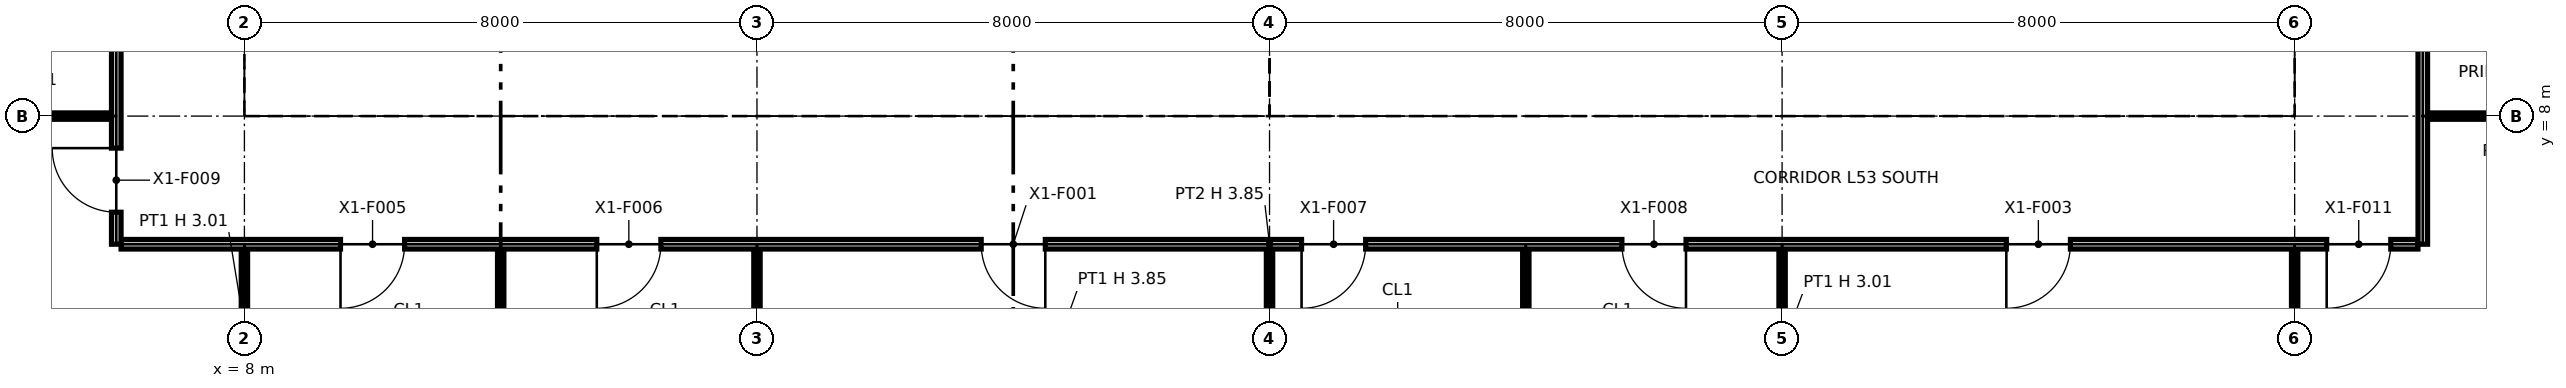
"""IFC4 building model, lengths in metres.
Left out: names, types, materials, properties, quantities, classifications, styles, units other than length and angle.
Written with IfcOpenShell. Run it as: python <this file> out.ifc"""

import sys

from ifc_helpers import new_model, si_unit, direction, frame, frame_2d, origin, origin_2d, place, context, subcontext, project, spatial, polyline, rectangle, i_section, outline, extrude, element, fill, save


model = new_model("IFC4")
c1 = context("Model", 3, precision=1e-05, world=origin(), true_north=direction((0.0, 1.0)))
c2 = subcontext(c1, "Body", "Model", "MODEL_VIEW")
j1 = project(units=[si_unit("LENGTHUNIT", "METRE"), si_unit("PLANEANGLEUNIT", "RADIAN")], contexts=[c1])
p1 = place(None, origin())
s1 = spatial("IfcSite", under=j1, at=p1, CompositionType="ELEMENT")
p2 = place(p1, origin())
s2 = spatial("IfcBuilding", under=s1, at=p2, CompositionType="ELEMENT")
p3 = place(p2, frame((0.0, 0.0, 247.0)))
s3 = spatial("IfcBuildingStorey", under=s2, at=p3, CompositionType="ELEMENT", Elevation=247.0)
for number, where, z_axis, x_axis in (
    (1, (8.0, 8.0, 0.0), (0.0, 0.0, 1.0), (1.0, 0.0, 0.0)),
    (2, (16.0, 8.0, 0.0), (0.0, 0.0, 1.0), (1.0, 0.0, 0.0)),
):
    element("IfcColumn", number, at=place(p3, frame(where, z_axis=z_axis, x_axis=x_axis)), inside=s3, PredefinedType="COLUMN", context=c2, shape_type="SweptSolid", body=[
        extrude(i_section(OverallWidth=0.371, OverallDepth=0.361, WebThickness=0.012, FlangeThickness=0.02, at=origin_2d()), origin(), (0.0, 0.0, 1.0), 3.85),
    ])
p4 = place(p3, frame((24.0, 8.0, 0.0), z_axis=(0.0, 0.0, 1.0), x_axis=(1.0, 0.0, 0.0)))
e3 = element("IfcColumn", 3, at=p4, inside=s3, PredefinedType="COLUMN", context=c2, shape_type="SweptSolid", body=[
    extrude(i_section(OverallWidth=0.373, OverallDepth=0.368, WebThickness=0.015, FlangeThickness=0.024, at=origin_2d()), origin(), (0.0, 0.0, 1.0), 3.85),
])
for number, where, z_axis, x_axis in (
    (4, (32.0, 8.0, 0.0), (0.0, 0.0, 1.0), (1.0, 0.0, 0.0)),
    (5, (40.0, 8.0, 0.0), (0.0, 0.0, 1.0), (1.0, 0.0, 0.0)),
):
    element("IfcColumn", number, at=place(p3, frame(where, z_axis=z_axis, x_axis=x_axis)), inside=s3, PredefinedType="COLUMN", context=c2, shape_type="SweptSolid", body=[
        extrude(i_section(OverallWidth=0.371, OverallDepth=0.361, WebThickness=0.012, FlangeThickness=0.02, at=origin_2d()), origin(), (0.0, 0.0, 1.0), 3.85),
    ])
p5 = place(p3, frame((8.65, 8.75, 0.0), z_axis=(0.0, 0.0, 1.0), x_axis=(1.0, 0.0, 0.0)))
e6 = element("IfcWall", 6, at=p5, inside=s3, PredefinedType="PARTITIONING", context=c2, shape_type="SweptSolid", body=[
    extrude(outline(polyline([(0.0, 0.0), (14.7, 0.0), (14.7, 3.85), (7.438, 3.85), (7.438, 3.308), (7.262, 3.308), (7.261, 3.85), (0.0, 3.85), (0.0, 0.0)])), frame((0.0, 0.1, 0.0), z_axis=(0.0, -1.0, 0.0), x_axis=(1.0, 0.0, 0.0)), (0.0, 0.0, 1.0), 0.2),
])
p6 = place(p5, frame((1.3, 0.0, 0.0)))
e7 = element("IfcOpeningElement", 7, at=p6, cuts=e6, PredefinedType="OPENING", context=c2, shape_type="SweptSolid", body=[
    extrude(rectangle(XDim=1.4, YDim=2.1, at=frame_2d((0.7, 1.05))), frame((0.0, 0.11, 0.0), z_axis=(0.0, -1.0, 0.0), x_axis=(1.0, 0.0, 0.0)), (0.0, 0.0, 1.0), 0.22),
])
p7 = place(p5, frame((4.6, 0.0, 0.0)))
e8 = element("IfcOpeningElement", 8, at=p7, cuts=e6, PredefinedType="OPENING", context=c2, shape_type="SweptSolid", body=[
    extrude(rectangle(XDim=1.4, YDim=2.1, at=frame_2d((0.7, 1.05))), frame((0.0, 0.11, 0.0), z_axis=(0.0, -1.0, 0.0), x_axis=(1.0, 0.0, 0.0)), (0.0, 0.0, 1.0), 0.22),
])
p8 = place(p5, frame((10.4, 0.0, 0.0)))
e9 = element("IfcOpeningElement", 9, at=p8, cuts=e6, PredefinedType="OPENING", context=c2, shape_type="SweptSolid", body=[
    extrude(rectangle(XDim=1.2, YDim=2.1, at=frame_2d((0.6, 1.05))), frame((0.0, 0.11, 0.0), z_axis=(0.0, -1.0, 0.0), x_axis=(1.0, 0.0, 0.0)), (0.0, 0.0, 1.0), 0.22),
])
p9 = place(p3, frame((8.75, 8.85, 0.0), z_axis=(0.0, 0.0, 1.0), x_axis=(0.0, 1.0, 0.0)))
e10 = element("IfcWall", 10, at=p9, inside=s3, PredefinedType="PARTITIONING", context=c2, shape_type="SweptSolid", body=[
    extrude(outline(polyline([(0.0, 0.0), (14.3, 0.0), (14.3, 3.85), (10.225, 3.85), (10.224, 3.44), (10.076, 3.44), (10.075, 3.85), (7.239, 3.85), (7.238, 3.308), (7.062, 3.308), (7.062, 3.85), (0.0, 3.85), (0.0, 0.0)])), frame((0.0, 0.1, 0.0), z_axis=(0.0, -1.0, 0.0), x_axis=(1.0, 0.0, 0.0)), (0.0, 0.0, 1.0), 0.2),
])
p10 = place(p9, frame((8.3, 0.0, 0.0)))
e11 = element("IfcOpeningElement", 11, at=p10, cuts=e10, PredefinedType="OPENING", context=c2, shape_type="SweptSolid", body=[
    extrude(rectangle(XDim=1.8, YDim=2.1, at=frame_2d((0.9, 1.05))), frame((0.0, 0.11, 0.0), z_axis=(0.0, -1.0, 0.0), x_axis=(1.0, 0.0, 0.0)), (0.0, 0.0, 1.0), 0.22),
])
p11 = place(p3, frame((12.4, 8.85, 0.0), z_axis=(0.0, 0.0, 1.0), x_axis=(0.0, 1.0, 0.0)))
e12 = element("IfcWall", 12, at=p11, inside=s3, PredefinedType="PARTITIONING", context=c2, shape_type="SweptSolid", body=[
    extrude(rectangle(XDim=6.85, YDim=0.2, at=frame_2d((3.425, 0.0))), origin(), (0.0, 0.0, 1.0), 3.85),
])
p12 = place(p3, frame((15.85, 8.85, 0.0), z_axis=(0.0, 0.0, 1.0), x_axis=(0.0, 1.0, 0.0)))
e13 = element("IfcWall", 13, at=p12, inside=s3, PredefinedType="PARTITIONING", context=c2, shape_type="SweptSolid", body=[
    extrude(rectangle(XDim=1.55, YDim=0.9, at=frame_2d((0.775, 0.0))), origin(), (0.0, 0.0, 1.0), 3.308),
])
p13 = place(p12, frame((0.3, 0.0, 0.0)))
e14 = element("IfcOpeningElement", 14, at=p13, cuts=e13, PredefinedType="OPENING", context=c2, shape_type="SweptSolid", body=[
    extrude(rectangle(XDim=1.1, YDim=2.1, at=frame_2d((0.55, 1.05))), frame((0.0, 0.46, 0.0), z_axis=(0.0, -1.0, 0.0), x_axis=(1.0, 0.0, 0.0)), (0.0, 0.0, 1.0), 0.92),
])
p14 = place(p3, frame((23.25, 8.85, 0.0), z_axis=(0.0, 0.0, 1.0), x_axis=(0.0, 1.0, 0.0)))
e15 = element("IfcWall", 15, at=p14, inside=s3, PredefinedType="PARTITIONING", context=c2, shape_type="SweptSolid", body=[
    extrude(outline(polyline([(0.0, 0.0), (14.3, 0.0), (14.3, 3.85), (10.225, 3.85), (10.224, 3.44), (10.076, 3.44), (10.075, 3.85), (7.239, 3.85), (7.238, 3.308), (7.062, 3.308), (7.062, 3.85), (5.225, 3.85), (5.224, 3.44), (5.076, 3.44), (5.075, 3.85), (0.0, 3.85), (0.0, 0.0)])), frame((0.0, 0.1, 0.0), z_axis=(0.0, -1.0, 0.0), x_axis=(1.0, 0.0, 0.0)), (0.0, 0.0, 1.0), 0.2),
])
p15 = place(p14, frame((8.3, 0.0, 0.0)))
e16 = element("IfcOpeningElement", 16, at=p15, cuts=e15, PredefinedType="OPENING", context=c2, shape_type="SweptSolid", body=[
    extrude(rectangle(XDim=1.8, YDim=2.1, at=frame_2d((0.9, 1.05))), frame((0.0, 0.11, 0.0), z_axis=(0.0, -1.0, 0.0), x_axis=(1.0, 0.0, 0.0)), (0.0, 0.0, 1.0), 0.22),
])
p16 = place(p3, frame((24.65, 8.75, 0.0), z_axis=(0.0, 0.0, 1.0), x_axis=(1.0, 0.0, 0.0)))
e17 = element("IfcWall", 17, at=p16, inside=s3, PredefinedType="PARTITIONING", context=c2, shape_type="SweptSolid", body=[
    extrude(outline(polyline([(0.0, 0.0), (14.7, 0.0), (14.7, 3.85), (7.438, 3.85), (7.438, 3.308), (7.262, 3.308), (7.261, 3.85), (0.0, 3.85), (0.0, 0.0)])), frame((0.0, 0.1, 0.0), z_axis=(0.0, -1.0, 0.0), x_axis=(1.0, 0.0, 0.0)), (0.0, 0.0, 1.0), 0.2),
])
p17 = place(p3, frame((24.75, 8.85, 0.0), z_axis=(0.0, 0.0, 1.0), x_axis=(0.0, 1.0, 0.0)))
e18 = element("IfcWall", 18, at=p17, inside=s3, PredefinedType="PARTITIONING", context=c2, shape_type="SweptSolid", body=[
    extrude(outline(polyline([(0.0, 0.0), (6.3, 0.0), (6.3, 3.85), (3.225, 3.85), (3.224, 3.44), (3.076, 3.44), (3.075, 3.85), (0.0, 3.85), (0.0, 0.0)])), frame((0.0, 0.1, 0.0), z_axis=(0.0, -1.0, 0.0), x_axis=(1.0, 0.0, 0.0)), (0.0, 0.0, 1.0), 0.2),
])
for number, where, z_axis, x_axis in (
    (19, (27.2, 8.85, 0.0), (0.0, 0.0, 1.0), (0.0, 1.0, 0.0)),
    (20, (29.5, 8.85, 0.0), (0.0, 0.0, 1.0), (0.0, 1.0, 0.0)),
):
    element("IfcWall", number, at=place(p3, frame(where, z_axis=z_axis, x_axis=x_axis)), inside=s3, PredefinedType="PARTITIONING", context=c2, shape_type="SweptSolid", body=[
        extrude(rectangle(XDim=2.55, YDim=0.2, at=frame_2d((1.275, 0.0))), origin(), (0.0, 0.0, 1.0), 3.85),
    ])
p18 = place(p3, frame((32.0, 8.85, 0.0), z_axis=(0.0, 0.0, 1.0), x_axis=(0.0, 1.0, 0.0)))
e21 = element("IfcWall", 21, at=p18, inside=s3, PredefinedType="PARTITIONING", context=c2, shape_type="SweptSolid", body=[
    extrude(rectangle(XDim=2.55, YDim=0.6, at=frame_2d((1.275, 0.0))), origin(), (0.0, 0.0, 1.0), 3.308),
])
for number, where, z_axis, x_axis in (
    (22, (35.6, 8.85, 0.0), (0.0, 0.0, 1.0), (0.0, 1.0, 0.0)),
    (23, (39.25, 8.85, 0.0), (0.0, 0.0, 1.0), (0.0, 1.0, 0.0)),
):
    element("IfcWall", number, at=place(p3, frame(where, z_axis=z_axis, x_axis=x_axis)), inside=s3, PredefinedType="PARTITIONING", context=c2, shape_type="SweptSolid", body=[
        extrude(rectangle(XDim=6.3, YDim=0.2, at=frame_2d((3.15, 0.0))), origin(), (0.0, 0.0, 1.0), 3.85),
    ])
p19 = place(p3, frame((40.0, 1.5, 0.0), z_axis=(0.0, 0.0, 1.0), x_axis=(0.0, 1.0, 0.0)))
e24 = element("IfcWall", 24, at=p19, inside=s3, PredefinedType="PARTITIONING", context=c2, shape_type="SweptSolid", body=[
    extrude(rectangle(XDim=4.425, YDim=0.1, at=frame_2d((2.212, 0.0))), origin(), (0.0, 0.0, 1.0), 3.014),
])
for number, where, z_axis, x_axis in (
    (25, (12.0, 2.83, 0.0), (0.0, 0.0, 1.0), (0.0, 1.0, 0.0)),
    (26, (16.0, 2.83, 0.0), (0.0, 0.0, 1.0), (0.0, 1.0, 0.0)),
    (27, (24.0, 2.83, 0.0), (0.0, 0.0, 1.0), (0.0, 1.0, 0.0)),
    (28, (28.0, 2.83, 0.0), (0.0, 0.0, 1.0), (0.0, 1.0, 0.0)),
    (29, (32.0, 2.83, 0.0), (0.0, 0.0, 1.0), (0.0, 1.0, 0.0)),
):
    element("IfcWall", number, at=place(p3, frame(where, z_axis=z_axis, x_axis=x_axis)), inside=s3, PredefinedType="PARTITIONING", context=c2, shape_type="SweptSolid", body=[
        extrude(rectangle(XDim=3.095, YDim=0.1, at=frame_2d((1.547, 0.0))), origin(), (0.0, 0.0, 1.0), 3.014),
    ])
p20 = place(p3, frame((8.0, 3.5, 0.0), z_axis=(0.0, 0.0, 1.0), x_axis=(0.0, 1.0, 0.0)))
e30 = element("IfcWall", 30, at=p20, inside=s3, PredefinedType="PARTITIONING", context=c2, shape_type="SweptSolid", body=[
    extrude(rectangle(XDim=2.425, YDim=0.1, at=frame_2d((1.212, 0.0))), origin(), (0.0, 0.0, 1.0), 3.014),
])
p21 = place(p3, frame((6.075, 6.0, 0.0), z_axis=(0.0, 0.0, 1.0), x_axis=(1.0, 0.0, 0.0)))
e31 = element("IfcWall", 31, at=p21, inside=s3, PredefinedType="PARTITIONING", context=c2, shape_type="SweptSolid", body=[
    extrude(rectangle(XDim=35.85, YDim=0.15, at=frame_2d((17.925, 0.0))), origin(), (0.0, 0.0, 1.0), 3.85),
])
p22 = place(p21, frame((14.425, 0.0, 0.0), z_axis=(0.0, 0.0, 1.0), x_axis=(-1.0, 0.0, 0.0)))
e32 = element("IfcOpeningElement", 32, at=p22, cuts=e31, PredefinedType="OPENING", context=c2, shape_type="SweptSolid", body=[
    extrude(rectangle(XDim=1.0, YDim=2.1, at=frame_2d((0.5, 1.05))), frame((0.0, 0.085, 0.0), z_axis=(0.0, -1.0, 0.0), x_axis=(1.0, 0.0, 0.0)), (0.0, 0.0, 1.0), 0.17),
])
p23 = place(p21, frame((30.425, 0.0, 0.0), z_axis=(0.0, 0.0, 1.0), x_axis=(-1.0, 0.0, 0.0)))
e33 = element("IfcOpeningElement", 33, at=p23, cuts=e31, PredefinedType="OPENING", context=c2, shape_type="SweptSolid", body=[
    extrude(rectangle(XDim=1.0, YDim=2.1, at=frame_2d((0.5, 1.05))), frame((0.0, 0.085, 0.0), z_axis=(0.0, -1.0, 0.0), x_axis=(1.0, 0.0, 0.0)), (0.0, 0.0, 1.0), 0.17),
])
p24 = place(p21, frame((4.425, 0.0, 0.0), z_axis=(0.0, 0.0, 1.0), x_axis=(-1.0, 0.0, 0.0)))
e34 = element("IfcOpeningElement", 34, at=p24, cuts=e31, PredefinedType="OPENING", context=c2, shape_type="SweptSolid", body=[
    extrude(rectangle(XDim=1.0, YDim=2.1, at=frame_2d((0.5, 1.05))), frame((0.0, 0.085, 0.0), z_axis=(0.0, -1.0, 0.0), x_axis=(1.0, 0.0, 0.0)), (0.0, 0.0, 1.0), 0.17),
])
p25 = place(p21, frame((8.425, 0.0, 0.0), z_axis=(0.0, 0.0, 1.0), x_axis=(-1.0, 0.0, 0.0)))
e35 = element("IfcOpeningElement", 35, at=p25, cuts=e31, PredefinedType="OPENING", context=c2, shape_type="SweptSolid", body=[
    extrude(rectangle(XDim=1.0, YDim=2.1, at=frame_2d((0.5, 1.05))), frame((0.0, 0.085, 0.0), z_axis=(0.0, -1.0, 0.0), x_axis=(1.0, 0.0, 0.0)), (0.0, 0.0, 1.0), 0.17),
])
p26 = place(p21, frame((19.425, 0.0, 0.0), z_axis=(0.0, 0.0, 1.0), x_axis=(-1.0, 0.0, 0.0)))
e36 = element("IfcOpeningElement", 36, at=p26, cuts=e31, PredefinedType="OPENING", context=c2, shape_type="SweptSolid", body=[
    extrude(rectangle(XDim=1.0, YDim=2.1, at=frame_2d((0.5, 1.05))), frame((0.0, 0.085, 0.0), z_axis=(0.0, -1.0, 0.0), x_axis=(1.0, 0.0, 0.0)), (0.0, 0.0, 1.0), 0.17),
])
p27 = place(p21, frame((24.425, 0.0, 0.0), z_axis=(0.0, 0.0, 1.0), x_axis=(-1.0, 0.0, 0.0)))
e37 = element("IfcOpeningElement", 37, at=p27, cuts=e31, PredefinedType="OPENING", context=c2, shape_type="SweptSolid", body=[
    extrude(rectangle(XDim=1.0, YDim=2.1, at=frame_2d((0.5, 1.05))), frame((0.0, 0.085, 0.0), z_axis=(0.0, -1.0, 0.0), x_axis=(1.0, 0.0, 0.0)), (0.0, 0.0, 1.0), 0.17),
])
p28 = place(p21, frame((35.425, 0.0, 0.0), z_axis=(0.0, 0.0, 1.0), x_axis=(-1.0, 0.0, 0.0)))
e38 = element("IfcOpeningElement", 38, at=p28, cuts=e31, PredefinedType="OPENING", context=c2, shape_type="SweptSolid", body=[
    extrude(rectangle(XDim=1.0, YDim=2.1, at=frame_2d((0.5, 1.05))), frame((0.0, 0.085, 0.0), z_axis=(0.0, -1.0, 0.0), x_axis=(1.0, 0.0, 0.0)), (0.0, 0.0, 1.0), 0.17),
])
p29 = place(p3, frame((6.0, 6.0, 0.0), z_axis=(0.0, 0.0, 1.0), x_axis=(0.0, 1.0, 0.0)))
e39 = element("IfcWall", 39, at=p29, inside=s3, PredefinedType="PARTITIONING", context=c2, shape_type="SweptSolid", body=[
    extrude(outline(polyline([(0.0, 0.0), (13.375, 0.0), (13.375, 3.85), (10.3, 3.85), (10.298, 3.014), (9.702, 3.014), (9.7, 3.85), (6.3, 3.85), (6.298, 3.014), (5.702, 3.014), (5.7, 3.85), (2.3, 3.85), (2.298, 3.014), (1.702, 3.014), (1.7, 3.85), (0.0, 3.85), (0.0, 0.0)])), frame((0.0, 0.075, 0.0), z_axis=(0.0, -1.0, 0.0), x_axis=(1.0, 0.0, 0.0)), (0.0, 0.0, 1.0), 0.15),
])
p30 = place(p29, frame((0.5, 0.0, 0.0)))
e40 = element("IfcOpeningElement", 40, at=p30, cuts=e39, PredefinedType="OPENING", context=c2, shape_type="SweptSolid", body=[
    extrude(rectangle(XDim=1.0, YDim=2.1, at=frame_2d((0.5, 1.05))), frame((0.0, 0.085, 0.0), z_axis=(0.0, -1.0, 0.0), x_axis=(1.0, 0.0, 0.0)), (0.0, 0.0, 1.0), 0.17),
])
p31 = place(p29, frame((3.5, 0.0, 0.0)))
e41 = element("IfcOpeningElement", 41, at=p31, cuts=e39, PredefinedType="OPENING", context=c2, shape_type="SweptSolid", body=[
    extrude(rectangle(XDim=1.0, YDim=2.1, at=frame_2d((0.5, 1.05))), frame((0.0, 0.085, 0.0), z_axis=(0.0, -1.0, 0.0), x_axis=(1.0, 0.0, 0.0)), (0.0, 0.0, 1.0), 0.17),
])
p32 = place(p29, frame((7.5, 0.0, 0.0)))
e42 = element("IfcOpeningElement", 42, at=p32, cuts=e39, PredefinedType="OPENING", context=c2, shape_type="SweptSolid", body=[
    extrude(rectangle(XDim=1.0, YDim=2.1, at=frame_2d((0.5, 1.05))), frame((0.0, 0.085, 0.0), z_axis=(0.0, -1.0, 0.0), x_axis=(1.0, 0.0, 0.0)), (0.0, 0.0, 1.0), 0.17),
])
p33 = place(p29, frame((11.225, 0.0, 0.0)))
e43 = element("IfcOpeningElement", 43, at=p33, cuts=e39, PredefinedType="OPENING", context=c2, shape_type="SweptSolid", body=[
    extrude(rectangle(XDim=1.0, YDim=2.1, at=frame_2d((0.5, 1.05))), frame((0.0, 0.085, 0.0), z_axis=(0.0, -1.0, 0.0), x_axis=(1.0, 0.0, 0.0)), (0.0, 0.0, 1.0), 0.17),
])
p34 = place(p3, frame((42.0, 6.0, 0.0), z_axis=(0.0, 0.0, 1.0), x_axis=(0.0, 1.0, 0.0)))
e44 = element("IfcWall", 44, at=p34, inside=s3, PredefinedType="PARTITIONING", context=c2, shape_type="SweptSolid", body=[
    extrude(rectangle(XDim=11.925, YDim=0.15, at=frame_2d((5.962, 0.0))), origin(), (0.0, 0.0, 1.0), 3.014),
])
p35 = place(p34, frame((4.5, 0.0, 0.0), z_axis=(0.0, 0.0, 1.0), x_axis=(-1.0, 0.0, 0.0)))
e45 = element("IfcOpeningElement", 45, at=p35, cuts=e44, PredefinedType="OPENING", context=c2, shape_type="SweptSolid", body=[
    extrude(rectangle(XDim=1.0, YDim=2.1, at=frame_2d((0.5, 1.05))), frame((0.0, 0.085, 0.0), z_axis=(0.0, -1.0, 0.0), x_axis=(1.0, 0.0, 0.0)), (0.0, 0.0, 1.0), 0.17),
])
p36 = place(p34, frame((8.5, 0.0, 0.0), z_axis=(0.0, 0.0, 1.0), x_axis=(-1.0, 0.0, 0.0)))
e46 = element("IfcOpeningElement", 46, at=p36, cuts=e44, PredefinedType="OPENING", context=c2, shape_type="SweptSolid", body=[
    extrude(rectangle(XDim=1.0, YDim=2.1, at=frame_2d((0.5, 1.05))), frame((0.0, 0.085, 0.0), z_axis=(0.0, -1.0, 0.0), x_axis=(1.0, 0.0, 0.0)), (0.0, 0.0, 1.0), 0.17),
])
p37 = place(p34, frame((11.5, 0.0, 0.0), z_axis=(0.0, 0.0, 1.0), x_axis=(-1.0, 0.0, 0.0)))
e47 = element("IfcOpeningElement", 47, at=p37, cuts=e44, PredefinedType="OPENING", context=c2, shape_type="SweptSolid", body=[
    extrude(rectangle(XDim=1.0, YDim=2.1, at=frame_2d((0.5, 1.05))), frame((0.0, 0.085, 0.0), z_axis=(0.0, -1.0, 0.0), x_axis=(1.0, 0.0, 0.0)), (0.0, 0.0, 1.0), 0.17),
])
for number, where, z_axis, x_axis in (
    (48, (2.83, 8.0, 0.0), (0.0, 0.0, 1.0), (1.0, 0.0, 0.0)),
    (49, (42.075, 8.0, 0.0), (0.0, 0.0, 1.0), (1.0, 0.0, 0.0)),
):
    element("IfcWall", number, at=place(p3, frame(where, z_axis=z_axis, x_axis=x_axis)), inside=s3, PredefinedType="PARTITIONING", context=c2, shape_type="SweptSolid", body=[
        extrude(rectangle(XDim=3.095, YDim=0.1, at=frame_2d((1.547, 0.0))), origin(), (0.0, 0.0, 1.0), 3.014),
    ])
p38 = place(p6, origin())
e50 = element("IfcDoor", 50, at=p38, inside=s3, OperationType="DOUBLE_DOOR_SINGLE_SWING", PredefinedType="NOTDEFINED", context=c2, shape_type="SweptSolid", body=[
    extrude(rectangle(XDim=1.4, YDim=2.1, at=frame_2d((0.7, 1.05))), frame((0.0, 0.025, 0.0), z_axis=(0.0, -1.0, 0.0), x_axis=(1.0, 0.0, 0.0)), (0.0, 0.0, 1.0), 0.05),
])
fill(e7, e50)
p39 = place(p7, origin())
e51 = element("IfcDoor", 51, at=p39, inside=s3, OperationType="DOUBLE_DOOR_SINGLE_SWING", PredefinedType="NOTDEFINED", context=c2, shape_type="SweptSolid", body=[
    extrude(rectangle(XDim=1.4, YDim=2.1, at=frame_2d((0.7, 1.05))), frame((0.0, 0.025, 0.0), z_axis=(0.0, -1.0, 0.0), x_axis=(1.0, 0.0, 0.0)), (0.0, 0.0, 1.0), 0.05),
])
fill(e8, e51)
p40 = place(p8, origin())
e52 = element("IfcDoor", 52, at=p40, inside=s3, OperationType="SINGLE_SWING_LEFT", PredefinedType="NOTDEFINED", context=c2, shape_type="SweptSolid", body=[
    extrude(rectangle(XDim=1.2, YDim=2.1, at=frame_2d((0.6, 1.05))), frame((0.0, 0.025, 0.0), z_axis=(0.0, -1.0, 0.0), x_axis=(1.0, 0.0, 0.0)), (0.0, 0.0, 1.0), 0.05),
])
fill(e9, e52)
p41 = place(p22, origin())
e53 = element("IfcDoor", 53, at=p41, inside=s3, OperationType="SINGLE_SWING_LEFT", PredefinedType="DOOR", context=c2, shape_type="SweptSolid", body=[
    extrude(rectangle(XDim=1.0, YDim=2.1, at=frame_2d((0.5, 1.05))), frame((0.0, 0.025, 0.0), z_axis=(0.0, -1.0, 0.0), x_axis=(1.0, 0.0, 0.0)), (0.0, 0.0, 1.0), 0.05),
])
fill(e32, e53)
p42 = place(p23, origin())
e54 = element("IfcDoor", 54, at=p42, inside=s3, OperationType="SINGLE_SWING_RIGHT", PredefinedType="DOOR", context=c2, shape_type="SweptSolid", body=[
    extrude(rectangle(XDim=1.0, YDim=2.1, at=frame_2d((0.5, 1.05))), frame((0.0, 0.025, 0.0), z_axis=(0.0, -1.0, 0.0), x_axis=(1.0, 0.0, 0.0)), (0.0, 0.0, 1.0), 0.05),
])
fill(e33, e54)
p43 = place(p24, origin())
e55 = element("IfcDoor", 55, at=p43, inside=s3, OperationType="SINGLE_SWING_RIGHT", PredefinedType="DOOR", context=c2, shape_type="SweptSolid", body=[
    extrude(rectangle(XDim=1.0, YDim=2.1, at=frame_2d((0.5, 1.05))), frame((0.0, 0.025, 0.0), z_axis=(0.0, -1.0, 0.0), x_axis=(1.0, 0.0, 0.0)), (0.0, 0.0, 1.0), 0.05),
])
fill(e34, e55)
p44 = place(p25, origin())
e56 = element("IfcDoor", 56, at=p44, inside=s3, OperationType="SINGLE_SWING_RIGHT", PredefinedType="DOOR", context=c2, shape_type="SweptSolid", body=[
    extrude(rectangle(XDim=1.0, YDim=2.1, at=frame_2d((0.5, 1.05))), frame((0.0, 0.025, 0.0), z_axis=(0.0, -1.0, 0.0), x_axis=(1.0, 0.0, 0.0)), (0.0, 0.0, 1.0), 0.05),
])
fill(e35, e56)
p45 = place(p26, origin())
e57 = element("IfcDoor", 57, at=p45, inside=s3, OperationType="SINGLE_SWING_RIGHT", PredefinedType="DOOR", context=c2, shape_type="SweptSolid", body=[
    extrude(rectangle(XDim=1.0, YDim=2.1, at=frame_2d((0.5, 1.05))), frame((0.0, 0.025, 0.0), z_axis=(0.0, -1.0, 0.0), x_axis=(1.0, 0.0, 0.0)), (0.0, 0.0, 1.0), 0.05),
])
fill(e36, e57)
p46 = place(p27, origin())
e58 = element("IfcDoor", 58, at=p46, inside=s3, OperationType="SINGLE_SWING_LEFT", PredefinedType="DOOR", context=c2, shape_type="SweptSolid", body=[
    extrude(rectangle(XDim=1.0, YDim=2.1, at=frame_2d((0.5, 1.05))), frame((0.0, 0.025, 0.0), z_axis=(0.0, -1.0, 0.0), x_axis=(1.0, 0.0, 0.0)), (0.0, 0.0, 1.0), 0.05),
])
fill(e37, e58)
p47 = place(p30, origin())
e59 = element("IfcDoor", 59, at=p47, inside=s3, OperationType="SINGLE_SWING_RIGHT", PredefinedType="DOOR", context=c2, shape_type="SweptSolid", body=[
    extrude(rectangle(XDim=1.0, YDim=2.1, at=frame_2d((0.5, 1.05))), frame((0.0, 0.025, 0.0), z_axis=(0.0, -1.0, 0.0), x_axis=(1.0, 0.0, 0.0)), (0.0, 0.0, 1.0), 0.05),
])
fill(e40, e59)
p48 = place(p28, origin())
e60 = element("IfcDoor", 60, at=p48, inside=s3, OperationType="SINGLE_SWING_RIGHT", PredefinedType="DOOR", context=c2, shape_type="SweptSolid", body=[
    extrude(rectangle(XDim=1.0, YDim=2.1, at=frame_2d((0.5, 1.05))), frame((0.0, 0.025, 0.0), z_axis=(0.0, -1.0, 0.0), x_axis=(1.0, 0.0, 0.0)), (0.0, 0.0, 1.0), 0.05),
])
fill(e38, e60)
save(model, sys.argv[1])
